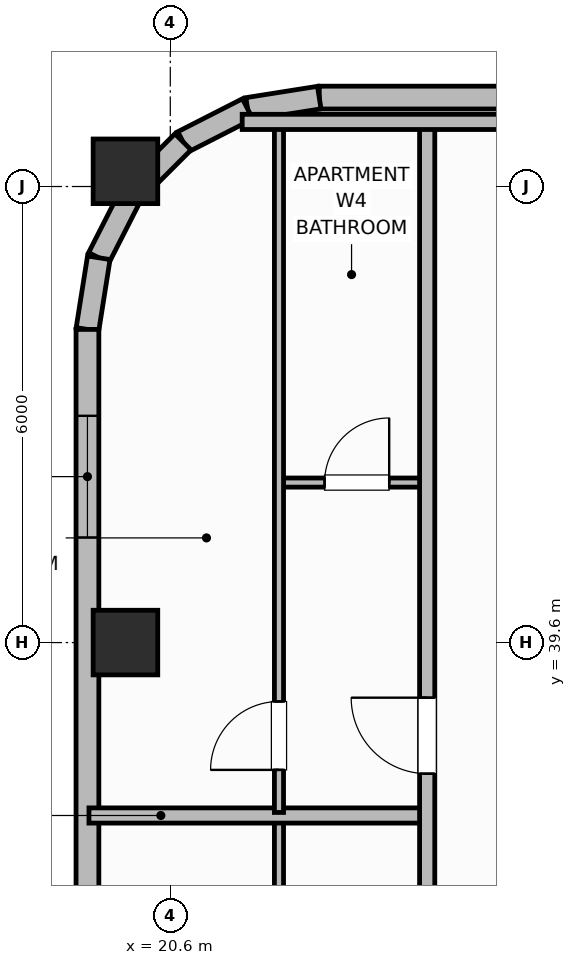
"""IFC4 building model, lengths in metres.
Left out: names, types, materials, properties, quantities, classifications, styles, units other than length and angle.
Written with IfcOpenShell. Run it as: python <this file> out.ifc"""

import sys

from ifc_helpers import new_model, si_unit, direction, frame, frame_2d, origin, origin_2d, place, context, subcontext, project, spatial, rectangle, extrude, element, fill, save


model = new_model("IFC4")
c1 = context("Model", 3, precision=1e-05, world=origin(), true_north=direction((0.0, 1.0)))
c2 = subcontext(c1, "Body", "Model", "MODEL_VIEW")
j1 = project(units=[si_unit("LENGTHUNIT", "METRE"), si_unit("PLANEANGLEUNIT", "RADIAN")], contexts=[c1])
p1 = place(None, origin())
s1 = spatial("IfcSite", under=j1, at=p1, CompositionType="ELEMENT")
p2 = place(p1, origin())
s2 = spatial("IfcBuilding", under=s1, at=p2, CompositionType="ELEMENT")
p3 = place(p2, frame((0.0, 0.0, 229.5)))
s3 = spatial("IfcBuildingStorey", under=s2, at=p3, CompositionType="ELEMENT", Elevation=229.5)
for number, where, z_axis, x_axis in (
    (1, (20.01, 39.6, 0.0), (0.0, 0.0, 1.0), (1.0, 0.0, 0.0)),
    (2, (20.01, 45.8, 0.0), (0.0, 0.0, 1.0), (1.0, 0.0, 0.0)),
):
    element("IfcColumn", number, at=place(p3, frame(where, z_axis=z_axis, x_axis=x_axis)), inside=s3, PredefinedType="COLUMN", context=c2, shape_type="SweptSolid", body=[
        extrude(rectangle(XDim=0.85, YDim=0.85, at=origin_2d()), origin(), (0.0, 0.0, 1.0), 3.7),
    ])
p4 = place(p3, frame((55.84, 46.77, 0.0), z_axis=(0.0, 0.0, 1.0), x_axis=(-1.0, 0.0, 0.0)))
e3 = element("IfcWall", 3, at=p4, inside=s3, PredefinedType="SOLIDWALL", context=c2, shape_type="SweptSolid", body=[
    extrude(rectangle(XDim=33.28, YDim=0.3, at=frame_2d((16.64, 0.0))), origin(), (0.0, 0.0, 1.0), 2.73),
])
p5 = place(p4, frame((5.08, 0.0, 0.76)))
e4 = element("IfcOpeningElement", 4, at=p5, cuts=e3, PredefinedType="OPENING", context=c2, shape_type="SweptSolid", body=[
    extrude(rectangle(XDim=1.8, YDim=1.85, at=frame_2d((0.9, 0.925))), frame((0.0, 0.16, 0.0), z_axis=(0.0, -1.0, 0.0), x_axis=(1.0, 0.0, 0.0)), (0.0, 0.0, 1.0), 0.32),
])
p6 = place(p4, frame((8.633, 0.0, 0.76)))
e5 = element("IfcOpeningElement", 5, at=p6, cuts=e3, PredefinedType="OPENING", context=c2, shape_type="SweptSolid", body=[
    extrude(rectangle(XDim=1.8, YDim=1.85, at=frame_2d((0.9, 0.925))), frame((0.0, 0.16, 0.0), z_axis=(0.0, -1.0, 0.0), x_axis=(1.0, 0.0, 0.0)), (0.0, 0.0, 1.0), 0.32),
])
p7 = place(p4, frame((15.74, 0.0, 0.76)))
e6 = element("IfcOpeningElement", 6, at=p7, cuts=e3, PredefinedType="OPENING", context=c2, shape_type="SweptSolid", body=[
    extrude(rectangle(XDim=1.8, YDim=1.85, at=frame_2d((0.9, 0.925))), frame((0.0, 0.16, 0.0), z_axis=(0.0, -1.0, 0.0), x_axis=(1.0, 0.0, 0.0)), (0.0, 0.0, 1.0), 0.32),
])
p8 = place(p4, frame((22.847, 0.0, 0.76)))
e7 = element("IfcOpeningElement", 7, at=p8, cuts=e3, PredefinedType="OPENING", context=c2, shape_type="SweptSolid", body=[
    extrude(rectangle(XDim=1.8, YDim=1.85, at=frame_2d((0.9, 0.925))), frame((0.0, 0.16, 0.0), z_axis=(0.0, -1.0, 0.0), x_axis=(1.0, 0.0, 0.0)), (0.0, 0.0, 1.0), 0.32),
])
p9 = place(p4, frame((26.4, 0.0, 0.76)))
e8 = element("IfcOpeningElement", 8, at=p9, cuts=e3, PredefinedType="OPENING", context=c2, shape_type="SweptSolid", body=[
    extrude(rectangle(XDim=1.8, YDim=1.85, at=frame_2d((0.9, 0.925))), frame((0.0, 0.16, 0.0), z_axis=(0.0, -1.0, 0.0), x_axis=(1.0, 0.0, 0.0)), (0.0, 0.0, 1.0), 0.32),
])
p10 = place(p3, frame((22.56, 46.77, 0.0), z_axis=(0.0, 0.0, 1.0), x_axis=(-0.987669453596, -0.156553666304, 0.0)))
e9 = element("IfcWall", 9, at=p10, inside=s3, PredefinedType="SOLIDWALL", context=c2, shape_type="SweptSolid", body=[
    extrude(rectangle(XDim=0.954, YDim=0.3, at=frame_2d((0.477, 0.0))), origin(), (0.0, 0.0, 1.0), 2.73),
])
p11 = place(p3, frame((21.617, 46.621, 0.0), z_axis=(0.0, 0.0, 1.0), x_axis=(-0.891023873617, -0.45395644796, 0.0)))
e10 = element("IfcWall", 10, at=p11, inside=s3, PredefinedType="SOLIDWALL", context=c2, shape_type="SweptSolid", body=[
    extrude(rectangle(XDim=0.954, YDim=0.3, at=frame_2d((0.477, 0.0))), origin(), (0.0, 0.0, 1.0), 2.73),
])
p12 = place(p3, frame((20.767, 46.188, 0.0), z_axis=(0.0, 0.0, 1.0), x_axis=(-0.707106781187, -0.707106781187, 0.0)))
e11 = element("IfcWall", 11, at=p12, inside=s3, PredefinedType="SOLIDWALL", context=c2, shape_type="SweptSolid", body=[
    extrude(rectangle(XDim=0.954, YDim=0.3, at=frame_2d((0.477, 0.0))), origin(), (0.0, 0.0, 1.0), 2.73),
])
p13 = place(p3, frame((20.093, 45.513, 0.0), z_axis=(0.0, 0.0, 1.0), x_axis=(-0.454159573051, -0.890920356825, 0.0)))
e12 = element("IfcWall", 12, at=p13, inside=s3, PredefinedType="SOLIDWALL", context=c2, shape_type="SweptSolid", body=[
    extrude(rectangle(XDim=0.954, YDim=0.3, at=frame_2d((0.477, 0.0))), origin(), (0.0, 0.0, 1.0), 2.73),
])
p14 = place(p3, frame((19.659, 44.663, 0.0), z_axis=(0.0, 0.0, 1.0), x_axis=(-0.156304114255, -0.987708977314, 0.0)))
e13 = element("IfcWall", 13, at=p14, inside=s3, PredefinedType="SOLIDWALL", context=c2, shape_type="SweptSolid", body=[
    extrude(rectangle(XDim=0.954, YDim=0.3, at=frame_2d((0.477, 0.0))), origin(), (0.0, 0.0, 1.0), 2.73),
])
p15 = place(p3, frame((19.51, 43.72, 0.0), z_axis=(0.0, 0.0, 1.0), x_axis=(0.0, -1.0, 0.0)))
e14 = element("IfcWall", 14, at=p15, inside=s3, PredefinedType="SOLIDWALL", context=c2, shape_type="SweptSolid", body=[
    extrude(rectangle(XDim=11.12, YDim=0.3, at=frame_2d((5.56, 0.0))), origin(), (0.0, 0.0, 1.0), 2.73),
])
p16 = place(p15, frame((1.137, 0.0, 0.71)))
e15 = element("IfcOpeningElement", 15, at=p16, cuts=e14, PredefinedType="OPENING", context=c2, shape_type="SweptSolid", body=[
    extrude(rectangle(XDim=1.6, YDim=1.9, at=frame_2d((0.8, 0.95))), frame((0.0, 0.16, 0.0), z_axis=(0.0, -1.0, 0.0), x_axis=(1.0, 0.0, 0.0)), (0.0, 0.0, 1.0), 0.32),
])
p17 = place(p15, frame((8.033, 0.0, 0.71)))
e16 = element("IfcOpeningElement", 16, at=p17, cuts=e14, PredefinedType="OPENING", context=c2, shape_type="SweptSolid", body=[
    extrude(rectangle(XDim=1.6, YDim=1.9, at=frame_2d((0.8, 0.95))), frame((0.0, 0.16, 0.0), z_axis=(0.0, -1.0, 0.0), x_axis=(1.0, 0.0, 0.0)), (0.0, 0.0, 1.0), 0.32),
])
p18 = place(p3, frame((22.03, 24.615, 0.0), z_axis=(0.0, 0.0, 1.0), x_axis=(0.0, 1.0, 0.0)))
e17 = element("IfcWall", 17, at=p18, inside=s3, PredefinedType="PARTITIONING", context=c2, shape_type="SweptSolid", body=[
    extrude(rectangle(XDim=12.67, YDim=0.12, at=frame_2d((6.335, 0.0))), origin(), (0.0, 0.0, 1.0), 2.56),
])
p19 = place(p18, frame((0.61, 0.0, 0.0)))
e18 = element("IfcOpeningElement", 18, at=p19, cuts=e17, PredefinedType="OPENING", context=c2, shape_type="SweptSolid", body=[
    extrude(rectangle(XDim=0.9, YDim=2.1, at=frame_2d((0.45, 1.05))), frame((0.0, 0.07, 0.0), z_axis=(0.0, -1.0, 0.0), x_axis=(1.0, 0.0, 0.0)), (0.0, 0.0, 1.0), 0.14),
])
p20 = place(p18, frame((10.51, 0.0, 0.0)))
e19 = element("IfcOpeningElement", 19, at=p20, cuts=e17, PredefinedType="OPENING", context=c2, shape_type="SweptSolid", body=[
    extrude(rectangle(XDim=0.82, YDim=2.08, at=frame_2d((0.41, 1.04))), frame((0.0, 0.07, 0.0), z_axis=(0.0, -1.0, 0.0), x_axis=(1.0, 0.0, 0.0)), (0.0, 0.0, 1.0), 0.14),
])
p21 = place(p3, frame((19.53, 37.325, 0.0), z_axis=(0.0, 0.0, 1.0), x_axis=(1.0, 0.0, 0.0)))
e20 = element("IfcWall", 20, at=p21, inside=s3, PredefinedType="PARTITIONING", context=c2, shape_type="SweptSolid", body=[
    extrude(rectangle(XDim=4.45, YDim=0.2, at=frame_2d((2.225, 0.0))), origin(), (0.0, 0.0, 1.0), 2.56),
])
p22 = place(p3, frame((22.03, 41.705, 0.0), z_axis=(0.0, 0.0, 1.0), x_axis=(1.0, 0.0, 0.0)))
e21 = element("IfcWall", 21, at=p22, inside=s3, PredefinedType="PARTITIONING", context=c2, shape_type="SweptSolid", body=[
    extrude(rectangle(XDim=1.95, YDim=0.12, at=frame_2d((0.975, 0.0))), origin(), (0.0, 0.0, 1.0), 2.56),
])
p23 = place(p22, frame((0.6, 0.0, 0.0)))
e22 = element("IfcOpeningElement", 22, at=p23, cuts=e21, PredefinedType="OPENING", context=c2, shape_type="SweptSolid", body=[
    extrude(rectangle(XDim=0.85, YDim=2.1, at=frame_2d((0.425, 1.05))), frame((0.0, 0.07, 0.0), z_axis=(0.0, -1.0, 0.0), x_axis=(1.0, 0.0, 0.0)), (0.0, 0.0, 1.0), 0.14),
])
p24 = place(p3, frame((22.03, 37.365, 0.0), z_axis=(0.0, 0.0, 1.0), x_axis=(0.0, 1.0, 0.0)))
e23 = element("IfcWall", 23, at=p24, inside=s3, PredefinedType="PARTITIONING", context=c2, shape_type="SweptSolid", body=[
    extrude(rectangle(XDim=9.045, YDim=0.12, at=frame_2d((4.522, 0.0))), origin(), (0.0, 0.0, 1.0), 2.56),
])
p25 = place(p24, frame((0.56, 0.0, 0.0)))
e24 = element("IfcOpeningElement", 24, at=p25, cuts=e23, PredefinedType="OPENING", context=c2, shape_type="SweptSolid", body=[
    extrude(rectangle(XDim=0.9, YDim=2.1, at=frame_2d((0.45, 1.05))), frame((0.0, 0.07, 0.0), z_axis=(0.0, -1.0, 0.0), x_axis=(1.0, 0.0, 0.0)), (0.0, 0.0, 1.0), 0.14),
])
p26 = place(p3, frame((23.98, 9.95, 0.0), z_axis=(0.0, 0.0, 1.0), x_axis=(0.0, 1.0, 0.0)))
e25 = element("IfcWall", 25, at=p26, inside=s3, PredefinedType="PARTITIONING", context=c2, shape_type="SweptSolid", body=[
    extrude(rectangle(XDim=36.5, YDim=0.2, at=frame_2d((18.25, 0.0))), origin(), (0.0, 0.0, 1.0), 2.56),
])
p27 = place(p26, frame((2.93, 0.0, 0.0)))
e26 = element("IfcOpeningElement", 26, at=p27, cuts=e25, PredefinedType="OPENING", context=c2, shape_type="SweptSolid", body=[
    extrude(rectangle(XDim=1.0, YDim=2.15, at=frame_2d((0.5, 1.075))), frame((0.0, 0.11, 0.0), z_axis=(0.0, -1.0, 0.0), x_axis=(1.0, 0.0, 0.0)), (0.0, 0.0, 1.0), 0.22),
])
p28 = place(p26, frame((10.525, 0.0, 0.0)))
e27 = element("IfcOpeningElement", 27, at=p28, cuts=e25, PredefinedType="OPENING", context=c2, shape_type="SweptSolid", body=[
    extrude(rectangle(XDim=1.0, YDim=2.15, at=frame_2d((0.5, 1.075))), frame((0.0, 0.11, 0.0), z_axis=(0.0, -1.0, 0.0), x_axis=(1.0, 0.0, 0.0)), (0.0, 0.0, 1.0), 0.22),
])
p29 = place(p26, frame((15.175, 0.0, 0.0)))
e28 = element("IfcOpeningElement", 28, at=p29, cuts=e25, PredefinedType="OPENING", context=c2, shape_type="SweptSolid", body=[
    extrude(rectangle(XDim=1.0, YDim=2.15, at=frame_2d((0.5, 1.075))), frame((0.0, 0.11, 0.0), z_axis=(0.0, -1.0, 0.0), x_axis=(1.0, 0.0, 0.0)), (0.0, 0.0, 1.0), 0.22),
])
p30 = place(p26, frame((27.925, 0.0, 0.0)))
e29 = element("IfcOpeningElement", 29, at=p30, cuts=e25, PredefinedType="OPENING", context=c2, shape_type="SweptSolid", body=[
    extrude(rectangle(XDim=1.0, YDim=2.15, at=frame_2d((0.5, 1.075))), frame((0.0, 0.11, 0.0), z_axis=(0.0, -1.0, 0.0), x_axis=(1.0, 0.0, 0.0)), (0.0, 0.0, 1.0), 0.22),
])
p31 = place(p3, frame((21.546, 46.45, 0.0), z_axis=(0.0, 0.0, 1.0), x_axis=(1.0, 0.0, 0.0)))
e30 = element("IfcWall", 30, at=p31, inside=s3, PredefinedType="PARTITIONING", context=c2, shape_type="SweptSolid", body=[
    extrude(rectangle(XDim=3.754, YDim=0.2, at=frame_2d((1.877, 0.0))), origin(), (0.0, 0.0, 1.0), 2.56),
])
p32 = place(p16, origin())
e31 = element("IfcWindow", 31, at=p32, inside=s3, PartitioningType="SINGLE_PANEL", PredefinedType="WINDOW", context=c2, shape_type="SweptSolid", body=[
    extrude(rectangle(XDim=1.6, YDim=1.9, at=frame_2d((0.8, 0.95))), frame((0.0, 0.03, 0.0), z_axis=(0.0, -1.0, 0.0), x_axis=(1.0, 0.0, 0.0)), (0.0, 0.0, 1.0), 0.06),
])
fill(e15, e31)
p33 = place(p23, origin())
e32 = element("IfcDoor", 32, at=p33, inside=s3, OperationType="SINGLE_SWING_RIGHT", PredefinedType="DOOR", context=c2, shape_type="SweptSolid", body=[
    extrude(rectangle(XDim=0.85, YDim=2.1, at=frame_2d((0.425, 1.05))), frame((0.0, 0.025, 0.0), z_axis=(0.0, -1.0, 0.0), x_axis=(1.0, 0.0, 0.0)), (0.0, 0.0, 1.0), 0.05),
])
fill(e22, e32)
p34 = place(p25, origin())
e33 = element("IfcDoor", 33, at=p34, inside=s3, OperationType="SINGLE_SWING_LEFT", PredefinedType="DOOR", context=c2, shape_type="SweptSolid", body=[
    extrude(rectangle(XDim=0.9, YDim=2.1, at=frame_2d((0.45, 1.05))), frame((0.0, 0.025, 0.0), z_axis=(0.0, -1.0, 0.0), x_axis=(1.0, 0.0, 0.0)), (0.0, 0.0, 1.0), 0.05),
])
fill(e24, e33)
p35 = place(p30, origin())
e34 = element("IfcDoor", 34, at=p35, inside=s3, OperationType="SINGLE_SWING_RIGHT", PredefinedType="DOOR", context=c2, shape_type="SweptSolid", body=[
    extrude(rectangle(XDim=1.0, YDim=2.15, at=frame_2d((0.5, 1.075))), frame((0.0, 0.025, 0.0), z_axis=(0.0, -1.0, 0.0), x_axis=(1.0, 0.0, 0.0)), (0.0, 0.0, 1.0), 0.05),
])
fill(e29, e34)
save(model, sys.argv[1])
